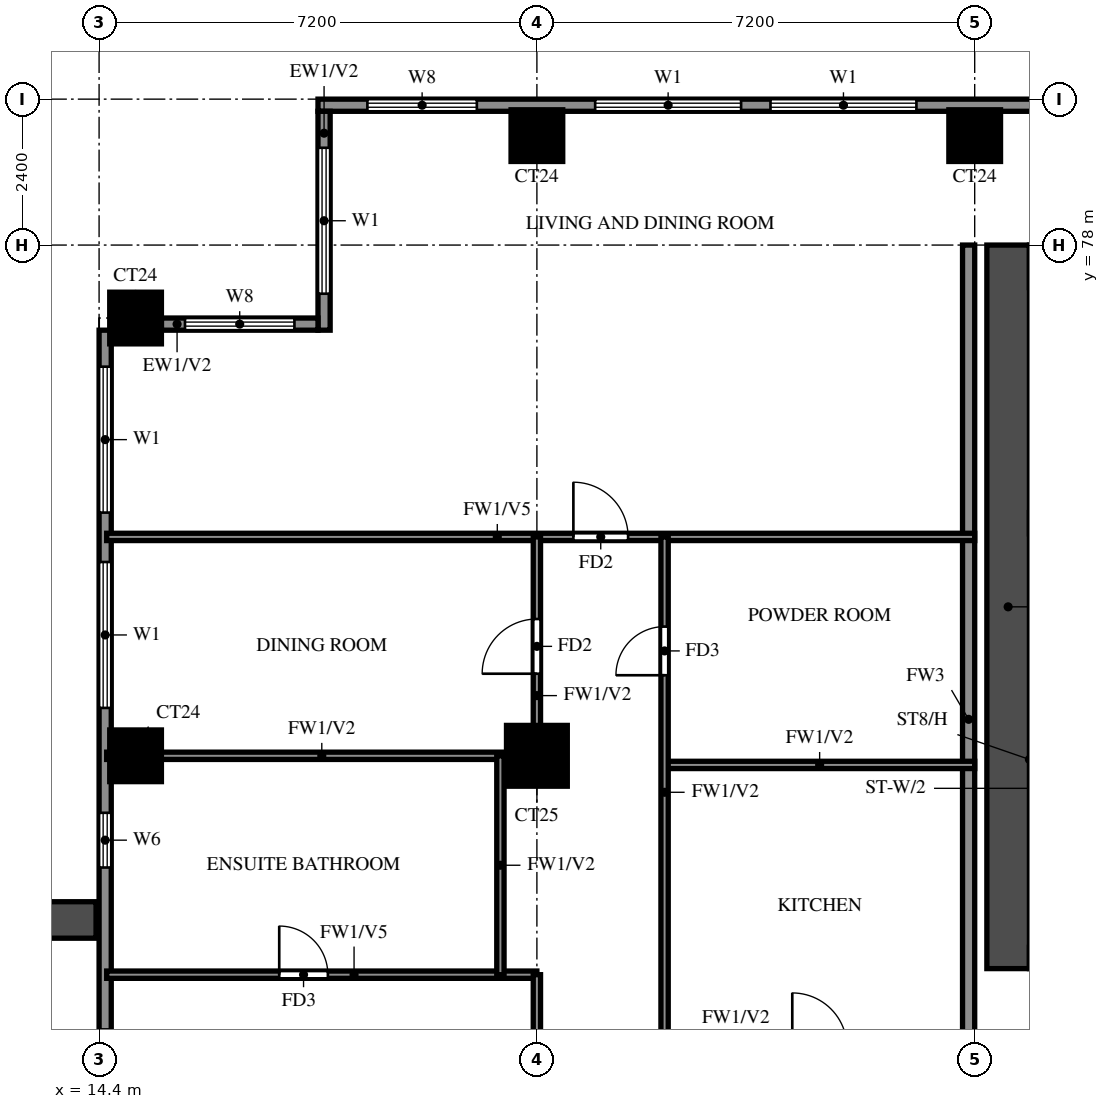
"""IFC4 building model, lengths in metres.
Left out: names, types, materials, properties, quantities, classifications, styles, units other than length and angle.
Written with IfcOpenShell. Run it as: python <this file> out.ifc"""

import sys

from ifc_helpers import new_model, si_unit, direction, frame, frame_2d, origin, origin_2d, place, context, subcontext, project, spatial, rectangle, extrude, source, transform, mapped, element, fill, save


model = new_model("IFC4")
c1 = context("Model", 3, precision=1e-05, world=origin(), true_north=direction((0.0, 1.0)))
c2 = subcontext(c1, "Body", "Model", "MODEL_VIEW")
j1 = project(units=[si_unit("LENGTHUNIT", "METRE"), si_unit("PLANEANGLEUNIT", "RADIAN")], contexts=[c1])
p1 = place(None, origin())
s1 = spatial("IfcSite", under=j1, at=p1, CompositionType="ELEMENT")
p2 = place(p1, origin())
s2 = spatial("IfcBuilding", under=s1, at=p2, CompositionType="ELEMENT")
p3 = place(p2, frame((0.0, 0.0, 171.0)))
s3 = spatial("IfcBuildingStorey", under=s2, at=p3, CompositionType="ELEMENT", Elevation=171.0)
m1 = source(origin(), c2, "Body", "SweptSolid", [
    extrude(rectangle(XDim=0.85, YDim=0.85, at=origin_2d()), origin(), (0.0, 0.0, 1.0), 3.2),
])
p4 = place(p3, frame((15.0, 69.6, 0.0), z_axis=(0.0, 0.0, 1.0), x_axis=(1.0, 0.0, 0.0)))
e1 = element("IfcColumn", 1, at=p4, inside=s3, PredefinedType="COLUMN", context=c2, shape_type="MappedRepresentation", body=[
    mapped(m1, transform((0.0, 0.0, 0.0))),
])
m2 = source(origin(), c2, "Body", "SweptSolid", [
    extrude(rectangle(XDim=1.0, YDim=1.0, at=origin_2d()), origin(), (0.0, 0.0, 1.0), 3.2),
])
p5 = place(p3, frame((21.6, 69.6, 0.0), z_axis=(0.0, 0.0, 1.0), x_axis=(1.0, 0.0, 0.0)))
e2 = element("IfcColumn", 2, at=p5, inside=s3, PredefinedType="COLUMN", context=c2, shape_type="MappedRepresentation", body=[
    mapped(m2, transform((0.0, 0.0, 0.0))),
])
for number, where, z_axis, x_axis in (
    (3, (15.0, 76.8, 0.0), (0.0, 0.0, 1.0), (1.0, 0.0, 0.0)),
    (4, (21.6, 79.8, 0.0), (0.0, 0.0, 1.0), (1.0, 0.0, 0.0)),
    (5, (28.8, 79.8, 0.0), (0.0, 0.0, 1.0), (1.0, 0.0, 0.0)),
):
    element("IfcColumn", number, at=place(p3, frame(where, z_axis=z_axis, x_axis=x_axis)), inside=s3, PredefinedType="COLUMN", context=c2, shape_type="MappedRepresentation", body=[
        mapped(m1, transform((0.0, 0.0, 0.0))),
    ])
p6 = place(p3, frame((29.35, 66.1, 0.0), z_axis=(0.0, 0.0, 1.0), x_axis=(0.0, 1.0, 0.0)))
e6 = element("IfcWall", 6, at=p6, inside=s3, PredefinedType="SHEAR", context=c2, shape_type="SweptSolid", body=[
    extrude(rectangle(XDim=11.9, YDim=0.7, at=frame_2d((5.95, 0.0))), origin(), (0.0, 0.0, 1.0), 3.2),
])
p7 = place(p3, frame((82.6, 80.3, 0.0), z_axis=(0.0, 0.0, 1.0), x_axis=(-1.0, 0.0, 0.0)))
e7 = element("IfcWall", 7, at=p7, inside=s3, PredefinedType="SOLIDWALL", context=c2, shape_type="SweptSolid", body=[
    extrude(rectangle(XDim=64.6, YDim=0.2, at=frame_2d((32.3, 0.0))), origin(), (0.0, 0.0, 1.0), 3.2),
])
p8 = place(p7, frame((4.3, 0.0, 0.0)))
e8 = element("IfcOpeningElement", 8, at=p8, cuts=e7, PredefinedType="OPENING", context=c2, shape_type="SweptSolid", body=[
    extrude(rectangle(XDim=1.8, YDim=2.4, at=frame_2d((0.9, 1.2))), frame((0.0, 0.11, 0.0), z_axis=(0.0, -1.0, 0.0), x_axis=(1.0, 0.0, 0.0)), (0.0, 0.0, 1.0), 0.22),
])
p9 = place(p7, frame((54.758, 0.0, 0.6)))
e9 = element("IfcOpeningElement", 9, at=p9, cuts=e7, PredefinedType="OPENING", context=c2, shape_type="SweptSolid", body=[
    extrude(rectangle(XDim=2.4, YDim=2.4, at=frame_2d((1.2, 1.2))), frame((0.0, 0.11, 0.0), z_axis=(0.0, -1.0, 0.0), x_axis=(1.0, 0.0, 0.0)), (0.0, 0.0, 1.0), 0.22),
])
p10 = place(p7, frame((57.642, 0.0, 0.6)))
e10 = element("IfcOpeningElement", 10, at=p10, cuts=e7, PredefinedType="OPENING", context=c2, shape_type="SweptSolid", body=[
    extrude(rectangle(XDim=2.4, YDim=2.4, at=frame_2d((1.2, 1.2))), frame((0.0, 0.11, 0.0), z_axis=(0.0, -1.0, 0.0), x_axis=(1.0, 0.0, 0.0)), (0.0, 0.0, 1.0), 0.22),
])
p11 = place(p7, frame((61.988, 0.0, 0.6)))
e11 = element("IfcOpeningElement", 11, at=p11, cuts=e7, PredefinedType="OPENING", context=c2, shape_type="SweptSolid", body=[
    extrude(rectangle(XDim=1.8, YDim=2.4, at=frame_2d((0.9, 1.2))), frame((0.0, 0.11, 0.0), z_axis=(0.0, -1.0, 0.0), x_axis=(1.0, 0.0, 0.0)), (0.0, 0.0, 1.0), 0.22),
])
p12 = place(p7, frame((1.712, 0.0, 0.6)))
e12 = element("IfcOpeningElement", 12, at=p12, cuts=e7, PredefinedType="OPENING", context=c2, shape_type="SweptSolid", body=[
    extrude(rectangle(XDim=1.2, YDim=2.4, at=frame_2d((0.6, 1.2))), frame((0.0, 0.11, 0.0), z_axis=(0.0, -1.0, 0.0), x_axis=(1.0, 0.0, 0.0)), (0.0, 0.0, 1.0), 0.22),
])
p13 = place(p7, frame((6.55, 0.0, 0.6)))
e13 = element("IfcOpeningElement", 13, at=p13, cuts=e7, PredefinedType="OPENING", context=c2, shape_type="SweptSolid", body=[
    extrude(rectangle(XDim=0.9, YDim=2.4, at=frame_2d((0.45, 1.2))), frame((0.0, 0.11, 0.0), z_axis=(0.0, -1.0, 0.0), x_axis=(1.0, 0.0, 0.0)), (0.0, 0.0, 1.0), 0.22),
])
p14 = place(p7, frame((8.312, 0.0, 0.6)))
e14 = element("IfcOpeningElement", 14, at=p14, cuts=e7, PredefinedType="OPENING", context=c2, shape_type="SweptSolid", body=[
    extrude(rectangle(XDim=1.8, YDim=2.4, at=frame_2d((0.9, 1.2))), frame((0.0, 0.11, 0.0), z_axis=(0.0, -1.0, 0.0), x_axis=(1.0, 0.0, 0.0)), (0.0, 0.0, 1.0), 0.22),
])
p15 = place(p3, frame((18.1, 80.2, 0.0), z_axis=(0.0, 0.0, 1.0), x_axis=(0.0, -1.0, 0.0)))
e15 = element("IfcWall", 15, at=p15, inside=s3, PredefinedType="SOLIDWALL", context=c2, shape_type="SweptSolid", body=[
    extrude(rectangle(XDim=3.6, YDim=0.2, at=frame_2d((1.8, 0.0))), origin(), (0.0, 0.0, 1.0), 3.2),
])
p16 = place(p15, frame((0.6, 0.0, 0.6)))
e16 = element("IfcOpeningElement", 16, at=p16, cuts=e15, PredefinedType="OPENING", context=c2, shape_type="SweptSolid", body=[
    extrude(rectangle(XDim=2.4, YDim=2.4, at=frame_2d((1.2, 1.2))), frame((0.0, 0.11, 0.0), z_axis=(0.0, -1.0, 0.0), x_axis=(1.0, 0.0, 0.0)), (0.0, 0.0, 1.0), 0.22),
])
p17 = place(p3, frame((18.0, 76.7, 0.0), z_axis=(0.0, 0.0, 1.0), x_axis=(-1.0, 0.0, 0.0)))
e17 = element("IfcWall", 17, at=p17, inside=s3, PredefinedType="SOLIDWALL", context=c2, shape_type="SweptSolid", body=[
    extrude(rectangle(XDim=2.575, YDim=0.2, at=frame_2d((1.288, 0.0))), origin(), (0.0, 0.0, 1.0), 3.2),
])
p18 = place(p17, frame((0.387, 0.0, 0.6)))
e18 = element("IfcOpeningElement", 18, at=p18, cuts=e17, PredefinedType="OPENING", context=c2, shape_type="SweptSolid", body=[
    extrude(rectangle(XDim=1.8, YDim=2.4, at=frame_2d((0.9, 1.2))), frame((0.0, 0.11, 0.0), z_axis=(0.0, -1.0, 0.0), x_axis=(1.0, 0.0, 0.0)), (0.0, 0.0, 1.0), 0.22),
])
p19 = place(p3, frame((14.5, 76.6, 0.0), z_axis=(0.0, 0.0, 1.0), x_axis=(0.0, -1.0, 0.0)))
e19 = element("IfcWall", 19, at=p19, inside=s3, PredefinedType="SOLIDWALL", context=c2, shape_type="SweptSolid", body=[
    extrude(rectangle(XDim=33.4, YDim=0.2, at=frame_2d((16.7, 0.0))), origin(), (0.0, 0.0, 1.0), 3.2),
])
p20 = place(p19, frame((11.5, 0.0, 0.0)))
e20 = element("IfcOpeningElement", 20, at=p20, cuts=e19, PredefinedType="OPENING", context=c2, shape_type="SweptSolid", body=[
    extrude(rectangle(XDim=1.8, YDim=2.4, at=frame_2d((0.9, 1.2))), frame((0.0, 0.11, 0.0), z_axis=(0.0, -1.0, 0.0), x_axis=(1.0, 0.0, 0.0)), (0.0, 0.0, 1.0), 0.22),
])
p21 = place(p19, frame((25.9, 0.0, 0.0)))
e21 = element("IfcOpeningElement", 21, at=p21, cuts=e19, PredefinedType="OPENING", context=c2, shape_type="SweptSolid", body=[
    extrude(rectangle(XDim=1.8, YDim=2.4, at=frame_2d((0.9, 1.2))), frame((0.0, 0.11, 0.0), z_axis=(0.0, -1.0, 0.0), x_axis=(1.0, 0.0, 0.0)), (0.0, 0.0, 1.0), 0.22),
])
p22 = place(p19, frame((29.087, 0.0, 0.6)))
e22 = element("IfcOpeningElement", 22, at=p22, cuts=e19, PredefinedType="OPENING", context=c2, shape_type="SweptSolid", body=[
    extrude(rectangle(XDim=1.2, YDim=2.4, at=frame_2d((0.6, 1.2))), frame((0.0, 0.11, 0.0), z_axis=(0.0, -1.0, 0.0), x_axis=(1.0, 0.0, 0.0)), (0.0, 0.0, 1.0), 0.22),
])
p23 = place(p19, frame((31.2, 0.0, 0.6)))
e23 = element("IfcOpeningElement", 23, at=p23, cuts=e19, PredefinedType="OPENING", context=c2, shape_type="SweptSolid", body=[
    extrude(rectangle(XDim=1.8, YDim=2.4, at=frame_2d((0.9, 1.2))), frame((0.0, 0.11, 0.0), z_axis=(0.0, -1.0, 0.0), x_axis=(1.0, 0.0, 0.0)), (0.0, 0.0, 1.0), 0.22),
])
p24 = place(p19, frame((22.337, 0.0, 1.5)))
e24 = element("IfcOpeningElement", 24, at=p24, cuts=e19, PredefinedType="OPENING", context=c2, shape_type="SweptSolid", body=[
    extrude(rectangle(XDim=0.9, YDim=0.9, at=frame_2d((0.45, 0.45))), frame((0.0, 0.11, 0.0), z_axis=(0.0, -1.0, 0.0), x_axis=(1.0, 0.0, 0.0)), (0.0, 0.0, 1.0), 0.22),
])
p25 = place(p19, frame((14.688, 0.0, 0.6)))
e25 = element("IfcOpeningElement", 25, at=p25, cuts=e19, PredefinedType="OPENING", context=c2, shape_type="SweptSolid", body=[
    extrude(rectangle(XDim=1.2, YDim=2.4, at=frame_2d((0.6, 1.2))), frame((0.0, 0.11, 0.0), z_axis=(0.0, -1.0, 0.0), x_axis=(1.0, 0.0, 0.0)), (0.0, 0.0, 1.0), 0.22),
])
p26 = place(p19, frame((17.613, 0.0, 0.6)))
e26 = element("IfcOpeningElement", 26, at=p26, cuts=e19, PredefinedType="OPENING", context=c2, shape_type="SweptSolid", body=[
    extrude(rectangle(XDim=2.4, YDim=2.4, at=frame_2d((1.2, 1.2))), frame((0.0, 0.11, 0.0), z_axis=(0.0, -1.0, 0.0), x_axis=(1.0, 0.0, 0.0)), (0.0, 0.0, 1.0), 0.22),
])
p27 = place(p19, frame((7.938, 0.0, 1.5)))
e27 = element("IfcOpeningElement", 27, at=p27, cuts=e19, PredefinedType="OPENING", context=c2, shape_type="SweptSolid", body=[
    extrude(rectangle(XDim=0.9, YDim=0.9, at=frame_2d((0.45, 0.45))), frame((0.0, 0.11, 0.0), z_axis=(0.0, -1.0, 0.0), x_axis=(1.0, 0.0, 0.0)), (0.0, 0.0, 1.0), 0.22),
])
p28 = place(p19, frame((3.812, 0.0, 0.6)))
e28 = element("IfcOpeningElement", 28, at=p28, cuts=e19, PredefinedType="OPENING", context=c2, shape_type="SweptSolid", body=[
    extrude(rectangle(XDim=2.4, YDim=2.4, at=frame_2d((1.2, 1.2))), frame((0.0, 0.11, 0.0), z_axis=(0.0, -1.0, 0.0), x_axis=(1.0, 0.0, 0.0)), (0.0, 0.0, 1.0), 0.22),
])
p29 = place(p19, frame((0.6, 0.0, 0.6)))
e29 = element("IfcOpeningElement", 29, at=p29, cuts=e19, PredefinedType="OPENING", context=c2, shape_type="SweptSolid", body=[
    extrude(rectangle(XDim=2.4, YDim=2.4, at=frame_2d((1.2, 1.2))), frame((0.0, 0.11, 0.0), z_axis=(0.0, -1.0, 0.0), x_axis=(1.0, 0.0, 0.0)), (0.0, 0.0, 1.0), 0.22),
])
p30 = place(p3, frame((14.35, 66.9, 0.0), z_axis=(0.0, 0.0, 1.0), x_axis=(-1.0, 0.0, 0.0)))
e30 = element("IfcWall", 30, at=p30, inside=s3, PredefinedType="SOLIDWALL", context=c2, shape_type="SweptSolid", body=[
    extrude(rectangle(XDim=2.65, YDim=0.6, at=frame_2d((1.325, 0.0))), origin(), (0.0, 0.0, 1.0), 2.85),
])
p31 = place(p3, frame((28.7, 62.4, 0.0), z_axis=(0.0, 0.0, 1.0), x_axis=(0.0, 1.0, 0.0)))
e31 = element("IfcWall", 31, at=p31, inside=s3, PredefinedType="SOLIDWALL", context=c2, shape_type="SweptSolid", body=[
    extrude(rectangle(XDim=15.6, YDim=0.2, at=frame_2d((7.8, 0.0))), origin(), (0.0, 0.0, 1.0), 3.2),
])
p32 = place(p3, frame((14.525, 66.0, 0.0), z_axis=(0.0, 0.0, 1.0), x_axis=(1.0, 0.0, 0.0)))
e32 = element("IfcWall", 32, at=p32, inside=s3, PredefinedType="PARTITIONING", context=c2, shape_type="SweptSolid", body=[
    extrude(rectangle(XDim=7.075, YDim=0.12, at=frame_2d((3.538, 0.0))), origin(), (0.0, 0.0, 1.0), 2.3),
])
p33 = place(p32, frame((2.837, 0.0, 0.0)))
e33 = element("IfcOpeningElement", 33, at=p33, cuts=e32, PredefinedType="OPENING", context=c2, shape_type="SweptSolid", body=[
    extrude(rectangle(XDim=0.8, YDim=2.1, at=frame_2d((0.4, 1.05))), frame((0.0, 0.07, 0.0), z_axis=(0.0, -1.0, 0.0), x_axis=(1.0, 0.0, 0.0)), (0.0, 0.0, 1.0), 0.14),
])
p34 = place(p3, frame((23.7, 69.45, 0.0), z_axis=(0.0, 0.0, 1.0), x_axis=(1.0, 0.0, 0.0)))
e34 = element("IfcWall", 34, at=p34, inside=s3, PredefinedType="PARTITIONING", context=c2, shape_type="SweptSolid", body=[
    extrude(rectangle(XDim=5.1, YDim=0.12, at=frame_2d((2.55, 0.0))), origin(), (0.0, 0.0, 1.0), 3.2),
])
p35 = place(p3, frame((14.525, 69.6, 0.0), z_axis=(0.0, 0.0, 1.0), x_axis=(1.0, 0.0, 0.0)))
e35 = element("IfcWall", 35, at=p35, inside=s3, PredefinedType="PARTITIONING", context=c2, shape_type="SweptSolid", body=[
    extrude(rectangle(XDim=7.075, YDim=0.12, at=frame_2d((3.538, 0.0))), origin(), (0.0, 0.0, 1.0), 3.2),
])
p36 = place(p3, frame((14.525, 73.2, 0.0), z_axis=(0.0, 0.0, 1.0), x_axis=(1.0, 0.0, 0.0)))
e36 = element("IfcWall", 36, at=p36, inside=s3, PredefinedType="PARTITIONING", context=c2, shape_type="SweptSolid", body=[
    extrude(rectangle(XDim=14.275, YDim=0.12, at=frame_2d((7.138, 0.0))), origin(), (0.0, 0.0, 1.0), 2.3),
])
p37 = place(p36, frame((7.675, 0.0, 0.0)))
e37 = element("IfcOpeningElement", 37, at=p37, cuts=e36, PredefinedType="OPENING", context=c2, shape_type="SweptSolid", body=[
    extrude(rectangle(XDim=0.9, YDim=2.1, at=frame_2d((0.45, 1.05))), frame((0.0, 0.07, 0.0), z_axis=(0.0, -1.0, 0.0), x_axis=(1.0, 0.0, 0.0)), (0.0, 0.0, 1.0), 0.14),
])
p38 = place(p3, frame((21.0, 66.0, 0.0), z_axis=(0.0, 0.0, 1.0), x_axis=(0.0, 1.0, 0.0)))
e38 = element("IfcWall", 38, at=p38, inside=s3, PredefinedType="PARTITIONING", context=c2, shape_type="SweptSolid", body=[
    extrude(rectangle(XDim=3.6, YDim=0.12, at=frame_2d((1.8, 0.0))), origin(), (0.0, 0.0, 1.0), 3.2),
])
p39 = place(p3, frame((21.6, 55.2, 0.0), z_axis=(0.0, 0.0, 1.0), x_axis=(0.0, 1.0, 0.0)))
e39 = element("IfcWall", 39, at=p39, inside=s3, PredefinedType="PARTITIONING", context=c2, shape_type="SweptSolid", body=[
    extrude(rectangle(XDim=10.8, YDim=0.12, at=frame_2d((5.4, 0.0))), origin(), (0.0, 0.0, 1.0), 3.2),
])
p40 = place(p39, frame((2.85, 0.0, 0.0)))
e40 = element("IfcOpeningElement", 40, at=p40, cuts=e39, PredefinedType="OPENING", context=c2, shape_type="SweptSolid", body=[
    extrude(rectangle(XDim=1.5, YDim=2.1, at=frame_2d((0.75, 1.05))), frame((0.0, 0.07, 0.0), z_axis=(0.0, -1.0, 0.0), x_axis=(1.0, 0.0, 0.0)), (0.0, 0.0, 1.0), 0.14),
])
p41 = place(p39, frame((8.55, 0.0, 0.0)))
e41 = element("IfcOpeningElement", 41, at=p41, cuts=e39, PredefinedType="OPENING", context=c2, shape_type="SweptSolid", body=[
    extrude(rectangle(XDim=0.9, YDim=2.1, at=frame_2d((0.45, 1.05))), frame((0.0, 0.07, 0.0), z_axis=(0.0, -1.0, 0.0), x_axis=(1.0, 0.0, 0.0)), (0.0, 0.0, 1.0), 0.14),
])
p42 = place(p3, frame((21.6, 69.6, 0.0), z_axis=(0.0, 0.0, 1.0), x_axis=(0.0, 1.0, 0.0)))
e42 = element("IfcWall", 42, at=p42, inside=s3, PredefinedType="PARTITIONING", context=c2, shape_type="SweptSolid", body=[
    extrude(rectangle(XDim=3.6, YDim=0.12, at=frame_2d((1.8, 0.0))), origin(), (0.0, 0.0, 1.0), 3.2),
])
p43 = place(p42, frame((1.35, 0.0, 0.0)))
e43 = element("IfcOpeningElement", 43, at=p43, cuts=e42, PredefinedType="OPENING", context=c2, shape_type="SweptSolid", body=[
    extrude(rectangle(XDim=0.9, YDim=2.1, at=frame_2d((0.45, 1.05))), frame((0.0, 0.07, 0.0), z_axis=(0.0, -1.0, 0.0), x_axis=(1.0, 0.0, 0.0)), (0.0, 0.0, 1.0), 0.14),
])
p44 = place(p3, frame((23.7, 64.8, 0.0), z_axis=(0.0, 0.0, 1.0), x_axis=(0.0, 1.0, 0.0)))
e44 = element("IfcWall", 44, at=p44, inside=s3, PredefinedType="PARTITIONING", context=c2, shape_type="SweptSolid", body=[
    extrude(rectangle(XDim=8.4, YDim=0.12, at=frame_2d((4.2, 0.0))), origin(), (0.0, 0.0, 1.0), 3.2),
])
p45 = place(p44, frame((6.125, 0.0, 0.0)))
e45 = element("IfcOpeningElement", 45, at=p45, cuts=e44, PredefinedType="OPENING", context=c2, shape_type="SweptSolid", body=[
    extrude(rectangle(XDim=0.8, YDim=2.1, at=frame_2d((0.4, 1.05))), frame((0.0, 0.07, 0.0), z_axis=(0.0, -1.0, 0.0), x_axis=(1.0, 0.0, 0.0)), (0.0, 0.0, 1.0), 0.14),
])
p46 = place(p9, origin())
e46 = element("IfcWindow", 46, at=p46, inside=s3, PartitioningType="DOUBLE_PANEL_VERTICAL", PredefinedType="WINDOW", context=c2, shape_type="SweptSolid", body=[
    extrude(rectangle(XDim=2.4, YDim=2.4, at=frame_2d((1.2, 1.2))), frame((0.0, 0.03, 0.0), z_axis=(0.0, -1.0, 0.0), x_axis=(1.0, 0.0, 0.0)), (0.0, 0.0, 1.0), 0.06),
])
fill(e9, e46)
p47 = place(p10, origin())
e47 = element("IfcWindow", 47, at=p47, inside=s3, PartitioningType="DOUBLE_PANEL_VERTICAL", PredefinedType="WINDOW", context=c2, shape_type="SweptSolid", body=[
    extrude(rectangle(XDim=2.4, YDim=2.4, at=frame_2d((1.2, 1.2))), frame((0.0, 0.03, 0.0), z_axis=(0.0, -1.0, 0.0), x_axis=(1.0, 0.0, 0.0)), (0.0, 0.0, 1.0), 0.06),
])
fill(e10, e47)
p48 = place(p11, origin())
e48 = element("IfcWindow", 48, at=p48, inside=s3, PartitioningType="DOUBLE_PANEL_VERTICAL", PredefinedType="WINDOW", context=c2, shape_type="SweptSolid", body=[
    extrude(rectangle(XDim=1.8, YDim=2.4, at=frame_2d((0.9, 1.2))), frame((0.0, 0.03, 0.0), z_axis=(0.0, -1.0, 0.0), x_axis=(1.0, 0.0, 0.0)), (0.0, 0.0, 1.0), 0.06),
])
fill(e11, e48)
p49 = place(p16, origin())
e49 = element("IfcWindow", 49, at=p49, inside=s3, PartitioningType="DOUBLE_PANEL_VERTICAL", PredefinedType="WINDOW", context=c2, shape_type="SweptSolid", body=[
    extrude(rectangle(XDim=2.4, YDim=2.4, at=frame_2d((1.2, 1.2))), frame((0.0, 0.03, 0.0), z_axis=(0.0, -1.0, 0.0), x_axis=(1.0, 0.0, 0.0)), (0.0, 0.0, 1.0), 0.06),
])
fill(e16, e49)
p50 = place(p18, origin())
e50 = element("IfcWindow", 50, at=p50, inside=s3, PartitioningType="DOUBLE_PANEL_VERTICAL", PredefinedType="WINDOW", context=c2, shape_type="SweptSolid", body=[
    extrude(rectangle(XDim=1.8, YDim=2.4, at=frame_2d((0.9, 1.2))), frame((0.0, 0.03, 0.0), z_axis=(0.0, -1.0, 0.0), x_axis=(1.0, 0.0, 0.0)), (0.0, 0.0, 1.0), 0.06),
])
fill(e18, e50)
p51 = place(p20, origin())
e51 = element("IfcDoor", 51, at=p51, inside=s3, OperationType="DOUBLE_DOOR_SLIDING", PredefinedType="DOOR", context=c2, shape_type="SweptSolid", body=[
    extrude(rectangle(XDim=1.8, YDim=2.4, at=frame_2d((0.9, 1.2))), frame((0.0, 0.025, 0.0), z_axis=(0.0, -1.0, 0.0), x_axis=(1.0, 0.0, 0.0)), (0.0, 0.0, 1.0), 0.05),
])
fill(e20, e51)
p52 = place(p27, origin())
e52 = element("IfcWindow", 52, at=p52, inside=s3, PartitioningType="SINGLE_PANEL", PredefinedType="WINDOW", context=c2, shape_type="SweptSolid", body=[
    extrude(rectangle(XDim=0.9, YDim=0.9, at=frame_2d((0.45, 0.45))), frame((0.0, 0.03, 0.0), z_axis=(0.0, -1.0, 0.0), x_axis=(1.0, 0.0, 0.0)), (0.0, 0.0, 1.0), 0.06),
])
fill(e27, e52)
p53 = place(p28, origin())
e53 = element("IfcWindow", 53, at=p53, inside=s3, PartitioningType="DOUBLE_PANEL_VERTICAL", PredefinedType="WINDOW", context=c2, shape_type="SweptSolid", body=[
    extrude(rectangle(XDim=2.4, YDim=2.4, at=frame_2d((1.2, 1.2))), frame((0.0, 0.03, 0.0), z_axis=(0.0, -1.0, 0.0), x_axis=(1.0, 0.0, 0.0)), (0.0, 0.0, 1.0), 0.06),
])
fill(e28, e53)
p54 = place(p29, origin())
e54 = element("IfcWindow", 54, at=p54, inside=s3, PartitioningType="DOUBLE_PANEL_VERTICAL", PredefinedType="WINDOW", context=c2, shape_type="SweptSolid", body=[
    extrude(rectangle(XDim=2.4, YDim=2.4, at=frame_2d((1.2, 1.2))), frame((0.0, 0.03, 0.0), z_axis=(0.0, -1.0, 0.0), x_axis=(1.0, 0.0, 0.0)), (0.0, 0.0, 1.0), 0.06),
])
fill(e29, e54)
p55 = place(p33, origin())
e55 = element("IfcDoor", 55, at=p55, inside=s3, OperationType="SINGLE_SWING_RIGHT", PredefinedType="DOOR", context=c2, shape_type="SweptSolid", body=[
    extrude(rectangle(XDim=0.8, YDim=2.1, at=frame_2d((0.4, 1.05))), frame((0.0, 0.025, 0.0), z_axis=(0.0, -1.0, 0.0), x_axis=(1.0, 0.0, 0.0)), (0.0, 0.0, 1.0), 0.05),
])
fill(e33, e55)
p56 = place(p43, origin())
e56 = element("IfcDoor", 56, at=p56, inside=s3, OperationType="SINGLE_SWING_LEFT", PredefinedType="DOOR", context=c2, shape_type="SweptSolid", body=[
    extrude(rectangle(XDim=0.9, YDim=2.1, at=frame_2d((0.45, 1.05))), frame((0.0, 0.025, 0.0), z_axis=(0.0, -1.0, 0.0), x_axis=(1.0, 0.0, 0.0)), (0.0, 0.0, 1.0), 0.05),
])
fill(e43, e56)
p57 = place(p37, origin())
e57 = element("IfcDoor", 57, at=p57, inside=s3, OperationType="SINGLE_SWING_LEFT", PredefinedType="DOOR", context=c2, shape_type="SweptSolid", body=[
    extrude(rectangle(XDim=0.9, YDim=2.1, at=frame_2d((0.45, 1.05))), frame((0.0, 0.025, 0.0), z_axis=(0.0, -1.0, 0.0), x_axis=(1.0, 0.0, 0.0)), (0.0, 0.0, 1.0), 0.05),
])
fill(e37, e57)
p58 = place(p45, origin())
e58 = element("IfcDoor", 58, at=p58, inside=s3, OperationType="SINGLE_SWING_LEFT", PredefinedType="DOOR", context=c2, shape_type="SweptSolid", body=[
    extrude(rectangle(XDim=0.8, YDim=2.1, at=frame_2d((0.4, 1.05))), frame((0.0, 0.025, 0.0), z_axis=(0.0, -1.0, 0.0), x_axis=(1.0, 0.0, 0.0)), (0.0, 0.0, 1.0), 0.05),
])
fill(e45, e58)
save(model, sys.argv[1])
